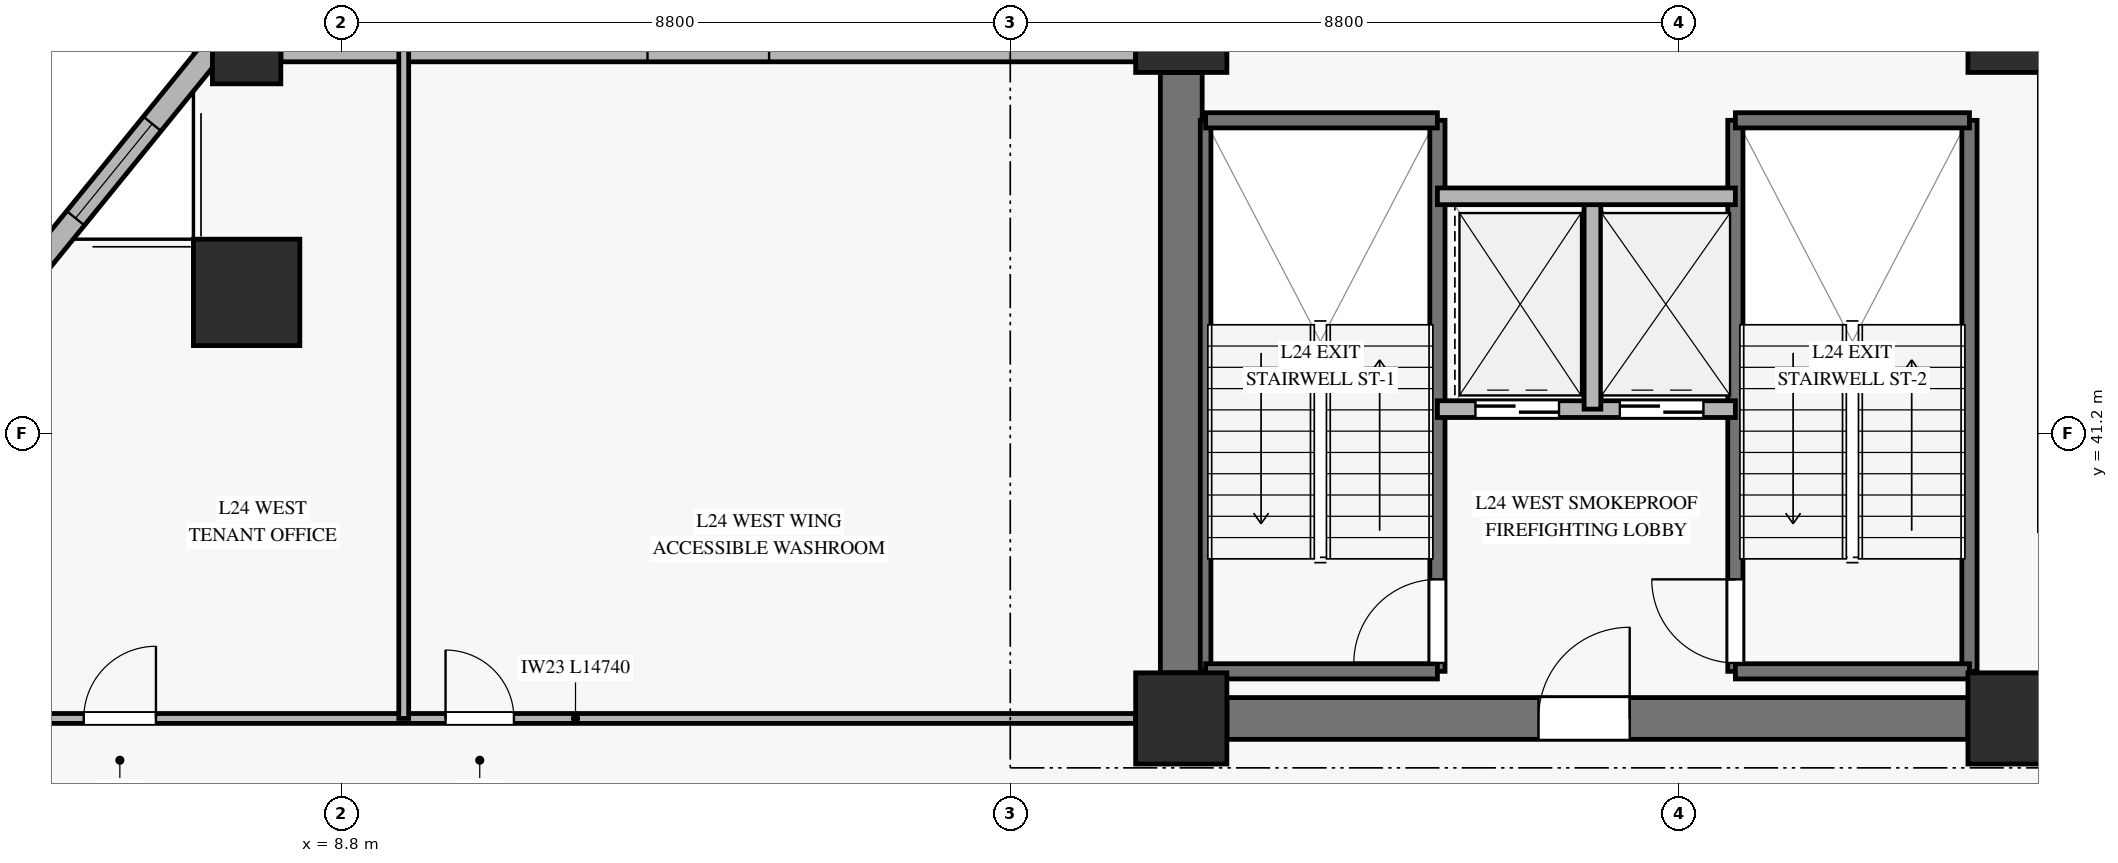
"""IFC4 building model, lengths in metres.
Left out: names, types, materials, properties, quantities, classifications, styles, units other than length and angle.
Written with IfcOpenShell. Run it as: python <this file> out.ifc"""

import sys

from ifc_helpers import new_model, si_unit, direction, frame, frame_2d, origin, origin_2d, place, context, subcontext, project, spatial, rectangle, hollow_rectangle, extrude, source, transform, mapped, element, fill, save


model = new_model("IFC4")
c1 = context("Model", 3, precision=1e-05, world=origin(), true_north=direction((0.0, 1.0)))
c2 = subcontext(c1, "Body", "Model", "MODEL_VIEW")
j1 = project(units=[si_unit("LENGTHUNIT", "METRE"), si_unit("PLANEANGLEUNIT", "RADIAN")], contexts=[c1])
p1 = place(None, origin())
s1 = spatial("IfcSite", under=j1, at=p1, CompositionType="ELEMENT")
p2 = place(p1, origin())
s2 = spatial("IfcBuilding", under=s1, at=p2, CompositionType="ELEMENT")
p3 = place(p2, frame((0.0, 0.0, 99.7)))
s3 = spatial("IfcBuildingStorey", under=s2, at=p3, CompositionType="ELEMENT", Elevation=99.7)
m1 = source(origin(), c2, "Body", "SweptSolid", [
    extrude(rectangle(XDim=1.2, YDim=1.2, at=origin_2d()), origin(), (0.0, 0.0, 1.0), 3.68),
])
for number, where, z_axis, x_axis in (
    (1, (19.85, 37.45, 0.0), (0.0, 0.0, 1.0), (1.0, 0.0, 0.0)),
    (2, (19.85, 46.55, 0.0), (0.0, 0.0, 1.0), (1.0, 0.0, 0.0)),
    (3, (30.8, 37.45, 0.0), (0.0, 0.0, 1.0), (1.0, 0.0, 0.0)),
    (4, (30.8, 46.55, 0.0), (0.0, 0.0, 1.0), (1.0, 0.0, 0.0)),
):
    element("IfcColumn", number, at=place(p3, frame(where, z_axis=z_axis, x_axis=x_axis)), inside=s3, PredefinedType="PILASTER", context=c2, shape_type="MappedRepresentation", body=[
        mapped(m1, transform((0.0, 0.0, 0.0), x_axis=(1.0, 0.0, 0.0), y_axis=(0.0, 1.0, 0.0), z_axis=(0.0, 0.0, 1.0), scale=1.0)),
    ])
p4 = place(p3, frame((20.45, 37.45, 0.0), z_axis=(0.0, 0.0, 1.0), x_axis=(1.0, 0.0, 0.0)))
e5 = element("IfcWall", 5, at=p4, inside=s3, PredefinedType="SHEAR", context=c2, shape_type="SweptSolid", body=[
    extrude(rectangle(XDim=9.75, YDim=0.55, at=frame_2d((4.875, 0.0))), origin(), (0.0, 0.0, 1.0), 3.68),
])
p5 = place(p4, frame((4.1, 0.0, 0.0)))
e6 = element("IfcOpeningElement", 6, at=p5, cuts=e5, PredefinedType="OPENING", context=c2, shape_type="SweptSolid", body=[
    extrude(rectangle(XDim=1.2, YDim=2.15, at=frame_2d((0.6, 1.075))), frame((0.0, 0.285, 0.0), z_axis=(0.0, -1.0, 0.0), x_axis=(1.0, 0.0, 0.0)), (0.0, 0.0, 1.0), 0.57),
])
p6 = place(p3, frame((19.85, 38.05, 0.0), z_axis=(0.0, 0.0, 1.0), x_axis=(0.0, 1.0, 0.0)))
e7 = element("IfcWall", 7, at=p6, inside=s3, PredefinedType="SHEAR", context=c2, shape_type="SweptSolid", body=[
    extrude(rectangle(XDim=7.9, YDim=0.55, at=frame_2d((3.95, 0.0))), origin(), (0.0, 0.0, 1.0), 3.68),
])
m2 = source(origin(), c2, "Body", "SweptSolid", [
    extrude(hollow_rectangle(XDim=1.4, YDim=1.4, WallThickness=0.065, at=origin_2d()), origin(), (0.0, 0.0, 1.0), 3.68),
])
p7 = place(p3, frame((7.553, 43.056, 0.0), z_axis=(0.0, 0.0, 1.0), x_axis=(1.0, 0.0, 0.0)))
e8 = element("IfcColumn", 8, at=p7, inside=s3, PredefinedType="COLUMN", context=c2, shape_type="MappedRepresentation", body=[
    mapped(m2, transform((0.0, 0.0, 0.0), x_axis=(1.0, 0.0, 0.0), y_axis=(0.0, 1.0, 0.0), z_axis=(0.0, 0.0, 1.0), scale=1.0)),
])
m3 = source(origin(), c2, "Body", "SweptSolid", [
    extrude(hollow_rectangle(XDim=0.9, YDim=0.9, WallThickness=0.04, at=origin_2d()), origin(), (0.0, 0.0, 1.0), 3.68),
])
p8 = place(p3, frame((7.553, 46.25, 0.0), z_axis=(0.0, 0.0, 1.0), x_axis=(1.0, 0.0, 0.0)))
e9 = element("IfcColumn", 9, at=p8, inside=s3, PredefinedType="COLUMN", context=c2, shape_type="MappedRepresentation", body=[
    mapped(m3, transform((0.0, 0.0, 0.0), x_axis=(1.0, 0.0, 0.0), y_axis=(0.0, 1.0, 0.0), z_axis=(0.0, 0.0, 1.0), scale=1.0)),
])
p9 = place(p3, frame((8.003, 46.25, 0.0), z_axis=(0.0, 0.0, 1.0), x_axis=(1.0, 0.0, 0.0)))
e10 = element("IfcWall", 10, at=p9, inside=s3, PredefinedType="SOLIDWALL", context=c2, shape_type="SweptSolid", body=[
    extrude(rectangle(XDim=11.247, YDim=0.32, at=frame_2d((5.624, 0.0))), origin(), (0.0, 0.0, 1.0), 3.16),
])
p10 = place(p9, frame((4.824, 0.0, 0.45)))
e11 = element("IfcOpeningElement", 11, at=p10, cuts=e10, PredefinedType="OPENING", context=c2, shape_type="SweptSolid", body=[
    extrude(rectangle(XDim=1.6, YDim=2.0, at=frame_2d((0.8, 1.0))), frame((0.0, 0.17, 0.0), z_axis=(0.0, -1.0, 0.0), x_axis=(1.0, 0.0, 0.0)), (0.0, 0.0, 1.0), 0.34),
])
p11 = place(p3, frame((7.103, 46.25, 0.0), z_axis=(0.0, 0.0, 1.0), x_axis=(-0.630273101398, -0.776373503962, 0.0)))
e12 = element("IfcWall", 12, at=p11, inside=s3, PredefinedType="SOLIDWALL", context=c2, shape_type="SweptSolid", body=[
    extrude(rectangle(XDim=4.114, YDim=0.3, at=frame_2d((2.057, 0.0))), origin(), (0.0, 0.0, 1.0), 3.16),
])
p12 = place(p11, frame((1.257, 0.0, 0.45)))
e13 = element("IfcOpeningElement", 13, at=p12, cuts=e12, PredefinedType="OPENING", context=c2, shape_type="SweptSolid", body=[
    extrude(rectangle(XDim=1.6, YDim=2.0, at=frame_2d((0.8, 1.0))), frame((0.0, 0.16, 0.0), z_axis=(0.0, -1.0, 0.0), x_axis=(1.0, 0.0, 0.0)), (0.0, 0.0, 1.0), 0.32),
])
p13 = place(p3, frame((20.17, 38.07, 0.0), z_axis=(0.0, 0.0, 1.0), x_axis=(0.0, 1.0, 0.0)))
e14 = element("IfcWall", 14, at=p13, inside=s3, PredefinedType="SOLIDWALL", context=c2, shape_type="SweptSolid", body=[
    extrude(rectangle(XDim=7.25, YDim=0.14, at=frame_2d((3.625, 0.0))), origin(), (0.0, 0.0, 1.0), 3.9),
])
p14 = place(p3, frame((23.22, 38.07, 0.0), z_axis=(0.0, 0.0, 1.0), x_axis=(0.0, 1.0, 0.0)))
e15 = element("IfcWall", 15, at=p14, inside=s3, PredefinedType="SOLIDWALL", context=c2, shape_type="SweptSolid", body=[
    extrude(rectangle(XDim=7.25, YDim=0.2, at=frame_2d((3.625, 0.0))), origin(), (0.0, 0.0, 1.0), 3.9),
])
p15 = place(p14, frame((0.11, 0.0, 0.0)))
e16 = element("IfcOpeningElement", 16, at=p15, cuts=e15, PredefinedType="OPENING", context=c2, shape_type="SweptSolid", body=[
    extrude(rectangle(XDim=1.1, YDim=2.15, at=frame_2d((0.55, 1.075))), frame((0.0, 0.11, 0.0), z_axis=(0.0, -1.0, 0.0), x_axis=(1.0, 0.0, 0.0)), (0.0, 0.0, 1.0), 0.22),
])
for number, where, z_axis, x_axis in (
    (17, (20.17, 45.32, 0.0), (0.0, 0.0, 1.0), (1.0, 0.0, 0.0)),
    (18, (20.17, 38.07, 0.0), (0.0, 0.0, 1.0), (1.0, 0.0, 0.0)),
):
    element("IfcWall", number, at=place(p3, frame(where, z_axis=z_axis, x_axis=x_axis)), inside=s3, PredefinedType="SOLIDWALL", context=c2, shape_type="SweptSolid", body=[
        extrude(rectangle(XDim=3.05, YDim=0.2, at=frame_2d((1.525, 0.0))), origin(), (0.0, 0.0, 1.0), 3.9),
    ])
p16 = place(p3, frame((27.14, 38.07, 0.0), z_axis=(0.0, 0.0, 1.0), x_axis=(0.0, 1.0, 0.0)))
e19 = element("IfcWall", 19, at=p16, inside=s3, PredefinedType="SOLIDWALL", context=c2, shape_type="SweptSolid", body=[
    extrude(rectangle(XDim=7.25, YDim=0.2, at=frame_2d((3.625, 0.0))), origin(), (0.0, 0.0, 1.0), 3.9),
])
p17 = place(p16, frame((0.11, 0.0, 0.0)))
e20 = element("IfcOpeningElement", 20, at=p17, cuts=e19, PredefinedType="OPENING", context=c2, shape_type="SweptSolid", body=[
    extrude(rectangle(XDim=1.1, YDim=2.15, at=frame_2d((0.55, 1.075))), frame((0.0, 0.11, 0.0), z_axis=(0.0, -1.0, 0.0), x_axis=(1.0, 0.0, 0.0)), (0.0, 0.0, 1.0), 0.22),
])
p18 = place(p3, frame((30.22, 38.07, 0.0), z_axis=(0.0, 0.0, 1.0), x_axis=(0.0, 1.0, 0.0)))
e21 = element("IfcWall", 21, at=p18, inside=s3, PredefinedType="SOLIDWALL", context=c2, shape_type="SweptSolid", body=[
    extrude(rectangle(XDim=7.25, YDim=0.2, at=frame_2d((3.625, 0.0))), origin(), (0.0, 0.0, 1.0), 3.9),
])
for number, where, z_axis, x_axis in (
    (22, (27.14, 45.32, 0.0), (0.0, 0.0, 1.0), (1.0, 0.0, 0.0)),
    (23, (27.14, 38.07, 0.0), (0.0, 0.0, 1.0), (1.0, 0.0, 0.0)),
):
    element("IfcWall", number, at=place(p3, frame(where, z_axis=z_axis, x_axis=x_axis)), inside=s3, PredefinedType="SOLIDWALL", context=c2, shape_type="SweptSolid", body=[
        extrude(rectangle(XDim=3.08, YDim=0.2, at=frame_2d((1.54, 0.0))), origin(), (0.0, 0.0, 1.0), 3.9),
    ])
p19 = place(p3, frame((23.22, 41.52, 0.0), z_axis=(0.0, 0.0, 1.0), x_axis=(1.0, 0.0, 0.0)))
e24 = element("IfcWall", 24, at=p19, inside=s3, PredefinedType="SOLIDWALL", context=c2, shape_type="SweptSolid", body=[
    extrude(rectangle(XDim=3.92, YDim=0.22, at=frame_2d((1.96, 0.0))), origin(), (0.0, 0.0, 1.0), 3.68),
])
p20 = place(p19, frame((0.5, 0.0, 0.0)))
e25 = element("IfcOpeningElement", 25, at=p20, cuts=e24, PredefinedType="OPENING", context=c2, shape_type="SweptSolid", body=[
    extrude(rectangle(XDim=1.1, YDim=2.2, at=frame_2d((0.55, 1.1))), frame((0.0, 0.12, 0.0), z_axis=(0.0, -1.0, 0.0), x_axis=(1.0, 0.0, 0.0)), (0.0, 0.0, 1.0), 0.24),
])
p21 = place(p19, frame((2.4, 0.0, 0.0)))
e26 = element("IfcOpeningElement", 26, at=p21, cuts=e24, PredefinedType="OPENING", context=c2, shape_type="SweptSolid", body=[
    extrude(rectangle(XDim=1.1, YDim=2.2, at=frame_2d((0.55, 1.1))), frame((0.0, 0.12, 0.0), z_axis=(0.0, -1.0, 0.0), x_axis=(1.0, 0.0, 0.0)), (0.0, 0.0, 1.0), 0.24),
])
p22 = place(p3, frame((25.26, 41.52, 0.0), z_axis=(0.0, 0.0, 1.0), x_axis=(0.0, 1.0, 0.0)))
e27 = element("IfcWall", 27, at=p22, inside=s3, PredefinedType="SOLIDWALL", context=c2, shape_type="SweptSolid", body=[
    extrude(rectangle(XDim=2.8, YDim=0.22, at=frame_2d((1.4, 0.0))), origin(), (0.0, 0.0, 1.0), 3.68),
])
p23 = place(p3, frame((23.22, 44.32, 0.0), z_axis=(0.0, 0.0, 1.0), x_axis=(1.0, 0.0, 0.0)))
e28 = element("IfcWall", 28, at=p23, inside=s3, PredefinedType="SOLIDWALL", context=c2, shape_type="SweptSolid", body=[
    extrude(rectangle(XDim=3.92, YDim=0.22, at=frame_2d((1.96, 0.0))), origin(), (0.0, 0.0, 1.0), 3.68),
])
p24 = place(p3, frame((4.51, 37.45, 0.0), z_axis=(0.0, 0.0, 1.0), x_axis=(1.0, 0.0, 0.0)))
e29 = element("IfcWall", 29, at=p24, inside=s3, PredefinedType="PARTITIONING", context=c2, shape_type="SweptSolid", body=[
    extrude(rectangle(XDim=14.74, YDim=0.13, at=frame_2d((7.37, 0.0))), origin(), (0.0, 0.0, 1.0), 3.165),
])
p25 = place(p24, frame((0.9, 0.0, 0.0)))
e30 = element("IfcOpeningElement", 30, at=p25, cuts=e29, PredefinedType="OPENING", context=c2, shape_type="SweptSolid", body=[
    extrude(rectangle(XDim=0.95, YDim=2.1, at=frame_2d((0.475, 1.05))), frame((0.0, 0.075, 0.0), z_axis=(0.0, -1.0, 0.0), x_axis=(1.0, 0.0, 0.0)), (0.0, 0.0, 1.0), 0.15),
])
p26 = place(p24, frame((5.66, 0.0, 0.0)))
e31 = element("IfcOpeningElement", 31, at=p26, cuts=e29, PredefinedType="OPENING", context=c2, shape_type="SweptSolid", body=[
    extrude(rectangle(XDim=0.9, YDim=2.1, at=frame_2d((0.45, 1.05))), frame((0.0, 0.075, 0.0), z_axis=(0.0, -1.0, 0.0), x_axis=(1.0, 0.0, 0.0)), (0.0, 0.0, 1.0), 0.15),
])
p27 = place(p3, frame((9.62, 37.45, 0.0), z_axis=(0.0, 0.0, 1.0), x_axis=(0.0, 1.0, 0.0)))
e32 = element("IfcWall", 32, at=p27, inside=s3, PredefinedType="PARTITIONING", context=c2, shape_type="SweptSolid", body=[
    extrude(rectangle(XDim=8.8, YDim=0.13, at=frame_2d((4.4, 0.0))), origin(), (0.0, 0.0, 1.0), 3.68),
])
m4 = source(origin(), c2, "Body", "SweptSolid", [
    extrude(rectangle(XDim=1.6, YDim=2.0, at=frame_2d((0.8, 1.0))), frame((0.0, 0.03, 0.0), z_axis=(0.0, -1.0, 0.0), x_axis=(1.0, 0.0, 0.0)), (0.0, 0.0, 1.0), 0.06),
])
p28 = place(p12, origin())
e33 = element("IfcWindow", 33, at=p28, inside=s3, PartitioningType="SINGLE_PANEL", PredefinedType="WINDOW", context=c2, shape_type="MappedRepresentation", body=[
    mapped(m4, transform((0.0, 0.0, 0.0), x_axis=(1.0, 0.0, 0.0), y_axis=(0.0, 1.0, 0.0), z_axis=(0.0, 0.0, 1.0), scale=1.0)),
])
fill(e13, e33)
m5 = source(origin(), c2, "Body", "SweptSolid", [
    extrude(rectangle(XDim=1.1, YDim=2.15, at=frame_2d((0.55, 1.075))), frame((0.0, 0.025, 0.0), z_axis=(0.0, -1.0, 0.0), x_axis=(1.0, 0.0, 0.0)), (0.0, 0.0, 1.0), 0.05),
])
p29 = place(p15, origin())
e34 = element("IfcDoor", 34, at=p29, inside=s3, OperationType="SINGLE_SWING_LEFT", PredefinedType="DOOR", context=c2, shape_type="MappedRepresentation", body=[
    mapped(m5, transform((0.0, 0.0, 0.0), x_axis=(1.0, 0.0, 0.0), y_axis=(0.0, 1.0, 0.0), z_axis=(0.0, 0.0, 1.0), scale=1.0)),
])
fill(e16, e34)
p30 = place(p17, origin())
e35 = element("IfcDoor", 35, at=p30, inside=s3, OperationType="SINGLE_SWING_RIGHT", PredefinedType="DOOR", context=c2, shape_type="MappedRepresentation", body=[
    mapped(m5, transform((0.0, 0.0, 0.0), x_axis=(1.0, 0.0, 0.0), y_axis=(0.0, 1.0, 0.0), z_axis=(0.0, 0.0, 1.0), scale=1.0)),
])
fill(e20, e35)
m6 = source(origin(), c2, "Body", "SweptSolid", [
    extrude(rectangle(XDim=1.1, YDim=2.2, at=frame_2d((0.55, 1.1))), frame((0.0, 0.025, 0.0), z_axis=(0.0, -1.0, 0.0), x_axis=(1.0, 0.0, 0.0)), (0.0, 0.0, 1.0), 0.05),
])
p31 = place(p20, origin())
e36 = element("IfcDoor", 36, at=p31, inside=s3, OperationType="SLIDING_TO_LEFT", PredefinedType="DOOR", context=c2, shape_type="MappedRepresentation", body=[
    mapped(m6, transform((0.0, 0.0, 0.0), x_axis=(1.0, 0.0, 0.0), y_axis=(0.0, 1.0, 0.0), z_axis=(0.0, 0.0, 1.0), scale=1.0)),
])
fill(e25, e36)
p32 = place(p21, origin())
e37 = element("IfcDoor", 37, at=p32, inside=s3, OperationType="SLIDING_TO_LEFT", PredefinedType="DOOR", context=c2, shape_type="MappedRepresentation", body=[
    mapped(m6, transform((0.0, 0.0, 0.0), x_axis=(1.0, 0.0, 0.0), y_axis=(0.0, 1.0, 0.0), z_axis=(0.0, 0.0, 1.0), scale=1.0)),
])
fill(e26, e37)
m7 = source(origin(), c2, "Body", "SweptSolid", [
    extrude(rectangle(XDim=1.2, YDim=2.15, at=frame_2d((0.6, 1.075))), frame((0.0, 0.025, 0.0), z_axis=(0.0, -1.0, 0.0), x_axis=(1.0, 0.0, 0.0)), (0.0, 0.0, 1.0), 0.05),
])
p33 = place(p5, origin())
e38 = element("IfcDoor", 38, at=p33, inside=s3, OperationType="SINGLE_SWING_RIGHT", PredefinedType="DOOR", context=c2, shape_type="MappedRepresentation", body=[
    mapped(m7, transform((0.0, 0.0, 0.0), x_axis=(1.0, 0.0, 0.0), y_axis=(0.0, 1.0, 0.0), z_axis=(0.0, 0.0, 1.0), scale=1.0)),
])
fill(e6, e38)
m8 = source(origin(), c2, "Body", "SweptSolid", [
    extrude(rectangle(XDim=0.95, YDim=2.1, at=frame_2d((0.475, 1.05))), frame((0.0, 0.025, 0.0), z_axis=(0.0, -1.0, 0.0), x_axis=(1.0, 0.0, 0.0)), (0.0, 0.0, 1.0), 0.05),
])
p34 = place(p25, origin())
e39 = element("IfcDoor", 39, at=p34, inside=s3, OperationType="SINGLE_SWING_RIGHT", PredefinedType="DOOR", context=c2, shape_type="MappedRepresentation", body=[
    mapped(m8, transform((0.0, 0.0, 0.0), x_axis=(1.0, 0.0, 0.0), y_axis=(0.0, 1.0, 0.0), z_axis=(0.0, 0.0, 1.0), scale=1.0)),
])
fill(e30, e39)
m9 = source(origin(), c2, "Body", "SweptSolid", [
    extrude(rectangle(XDim=0.9, YDim=2.1, at=frame_2d((0.45, 1.05))), frame((0.0, 0.025, 0.0), z_axis=(0.0, -1.0, 0.0), x_axis=(1.0, 0.0, 0.0)), (0.0, 0.0, 1.0), 0.05),
])
p35 = place(p26, origin())
e40 = element("IfcDoor", 40, at=p35, inside=s3, OperationType="SINGLE_SWING_LEFT", PredefinedType="DOOR", context=c2, shape_type="MappedRepresentation", body=[
    mapped(m9, transform((0.0, 0.0, 0.0), x_axis=(1.0, 0.0, 0.0), y_axis=(0.0, 1.0, 0.0), z_axis=(0.0, 0.0, 1.0), scale=1.0)),
])
fill(e31, e40)
save(model, sys.argv[1])
